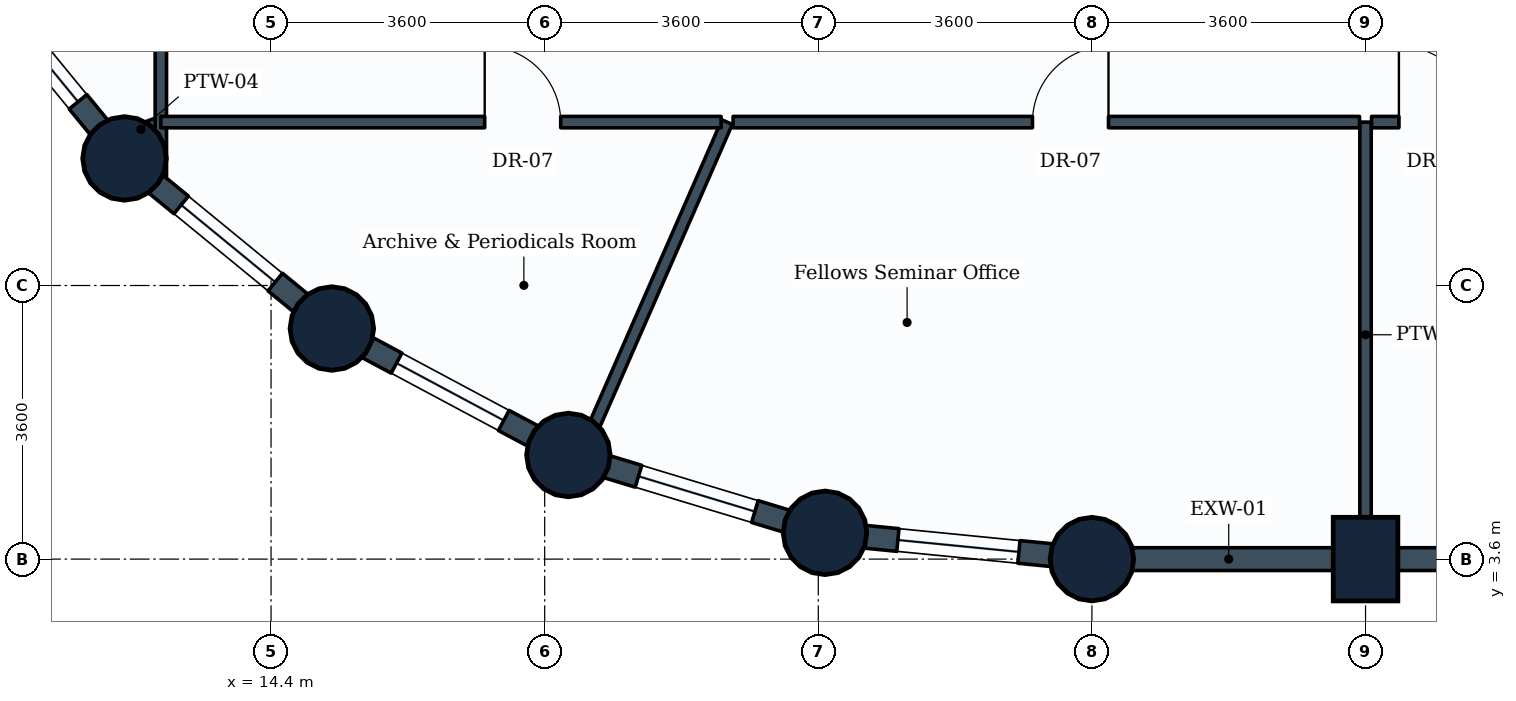
"""IFC4 building model, lengths in metres.
Left out: names, types, materials, properties, quantities, classifications, styles, units other than length and angle.
Written with IfcOpenShell. Run it as: python <this file> out.ifc"""

import sys

from ifc_helpers import new_model, si_unit, direction, frame, frame_2d, origin, origin_2d, place, context, subcontext, project, spatial, rectangle, circle, extrude, element, fill, save


model = new_model("IFC4")
c1 = context("Model", 3, precision=1e-05, world=origin(), true_north=direction((0.0, 1.0)))
c2 = subcontext(c1, "Body", "Model", "MODEL_VIEW")
j1 = project(units=[si_unit("LENGTHUNIT", "METRE"), si_unit("PLANEANGLEUNIT", "RADIAN")], contexts=[c1])
p1 = place(None, origin())
s1 = spatial("IfcSite", under=j1, at=p1, CompositionType="ELEMENT")
p2 = place(p1, origin())
s2 = spatial("IfcBuilding", under=s1, at=p2, CompositionType="ELEMENT")
p3 = place(p2, frame((0.0, 0.0, 91.8)))
s3 = spatial("IfcBuildingStorey", under=s2, at=p3, CompositionType="ELEMENT", Elevation=91.8)
for number, where, z_axis, x_axis in (
    (1, (12.472, 8.872, 0.0), (0.0, 0.0, 1.0), (1.0, 0.0, 0.0)),
    (2, (15.2, 6.634, 0.0), (0.0, 0.0, 1.0), (1.0, 0.0, 0.0)),
    (3, (18.312, 4.97, 0.0), (0.0, 0.0, 1.0), (1.0, 0.0, 0.0)),
    (4, (21.688, 3.946, 0.0), (0.0, 0.0, 1.0), (1.0, 0.0, 0.0)),
    (5, (25.2, 3.6, 0.0), (0.0, 0.0, 1.0), (1.0, 0.0, 0.0)),
):
    element("IfcColumn", number, at=place(p3, frame(where, z_axis=z_axis, x_axis=x_axis)), inside=s3, PredefinedType="COLUMN", context=c2, shape_type="SweptSolid", body=[
        extrude(circle(Radius=0.55, at=origin_2d()), origin(), (0.0, 0.0, 1.0), 3.9),
    ])
p4 = place(p3, frame((28.8, 3.6, 0.0), z_axis=(0.0, 0.0, 1.0), x_axis=(1.0, 0.0, 0.0)))
e6 = element("IfcColumn", 6, at=p4, inside=s3, PredefinedType="COLUMN", context=c2, shape_type="SweptSolid", body=[
    extrude(rectangle(XDim=0.85, YDim=1.1, at=origin_2d()), origin(), (0.0, 0.0, 1.0), 3.9),
])
p5 = place(p3, frame((28.8, 3.6, 0.0), z_axis=(0.0, 0.0, 1.0), x_axis=(-1.0, 0.0, 0.0)))
e7 = element("IfcWall", 7, at=p5, inside=s3, PredefinedType="STANDARD", context=c2, shape_type="SweptSolid", body=[
    extrude(rectangle(XDim=3.6, YDim=0.3, at=frame_2d((1.8, 0.0))), origin(), (0.0, 0.0, 1.0), 2.93),
])
p6 = place(p3, frame((32.4, 3.6, 0.0), z_axis=(0.0, 0.0, 1.0), x_axis=(-1.0, 0.0, 0.0)))
e8 = element("IfcWall", 8, at=p6, inside=s3, PredefinedType="STANDARD", context=c2, shape_type="SweptSolid", body=[
    extrude(rectangle(XDim=3.6, YDim=0.3, at=frame_2d((1.8, 0.0))), origin(), (0.0, 0.0, 1.0), 2.93),
])
p7 = place(p3, frame((12.472, 8.872, 0.0), z_axis=(0.0, 0.0, 1.0), x_axis=(-0.634258295121, 0.773121216285, 0.0)))
e9 = element("IfcWall", 9, at=p7, inside=s3, PredefinedType="STANDARD", context=c2, shape_type="SweptSolid", body=[
    extrude(rectangle(XDim=3.529, YDim=0.3, at=frame_2d((1.764, 0.0))), origin(), (0.0, 0.0, 1.0), 2.93),
])
p8 = place(p7, frame((0.964, 0.0, 0.85)))
e10 = element("IfcOpeningElement", 10, at=p8, cuts=e9, PredefinedType="OPENING", context=c2, shape_type="SweptSolid", body=[
    extrude(rectangle(XDim=1.6, YDim=1.35, at=frame_2d((0.8, 0.675))), frame((0.0, 0.16, 0.0), z_axis=(0.0, -1.0, 0.0), x_axis=(1.0, 0.0, 0.0)), (0.0, 0.0, 1.0), 0.32),
])
p9 = place(p3, frame((15.2, 6.634, 0.0), z_axis=(0.0, 0.0, 1.0), x_axis=(-0.773121216285, 0.634258295121, 0.0)))
e11 = element("IfcWall", 11, at=p9, inside=s3, PredefinedType="STANDARD", context=c2, shape_type="SweptSolid", body=[
    extrude(rectangle(XDim=3.529, YDim=0.3, at=frame_2d((1.764, 0.0))), origin(), (0.0, 0.0, 1.0), 2.93),
])
p10 = place(p9, frame((0.964, 0.0, 0.85)))
e12 = element("IfcOpeningElement", 12, at=p10, cuts=e11, PredefinedType="OPENING", context=c2, shape_type="SweptSolid", body=[
    extrude(rectangle(XDim=1.6, YDim=1.35, at=frame_2d((0.8, 0.675))), frame((0.0, 0.16, 0.0), z_axis=(0.0, -1.0, 0.0), x_axis=(1.0, 0.0, 0.0)), (0.0, 0.0, 1.0), 0.32),
])
p11 = place(p3, frame((18.312, 4.97, 0.0), z_axis=(0.0, 0.0, 1.0), x_axis=(-0.881846862014, 0.471535907389, 0.0)))
e13 = element("IfcWall", 13, at=p11, inside=s3, PredefinedType="STANDARD", context=c2, shape_type="SweptSolid", body=[
    extrude(rectangle(XDim=3.529, YDim=0.3, at=frame_2d((1.765, 0.0))), origin(), (0.0, 0.0, 1.0), 2.93),
])
p12 = place(p11, frame((0.964, 0.0, 0.85)))
e14 = element("IfcOpeningElement", 14, at=p12, cuts=e13, PredefinedType="OPENING", context=c2, shape_type="SweptSolid", body=[
    extrude(rectangle(XDim=1.6, YDim=1.35, at=frame_2d((0.8, 0.675))), frame((0.0, 0.16, 0.0), z_axis=(0.0, -1.0, 0.0), x_axis=(1.0, 0.0, 0.0)), (0.0, 0.0, 1.0), 0.32),
])
p13 = place(p3, frame((21.688, 3.946, 0.0), z_axis=(0.0, 0.0, 1.0), x_axis=(-0.956953367403, 0.290241714123, 0.0)))
e15 = element("IfcWall", 15, at=p13, inside=s3, PredefinedType="STANDARD", context=c2, shape_type="SweptSolid", body=[
    extrude(rectangle(XDim=3.528, YDim=0.3, at=frame_2d((1.764, 0.0))), origin(), (0.0, 0.0, 1.0), 2.93),
])
p14 = place(p13, frame((0.964, 0.0, 0.85)))
e16 = element("IfcOpeningElement", 16, at=p14, cuts=e15, PredefinedType="OPENING", context=c2, shape_type="SweptSolid", body=[
    extrude(rectangle(XDim=1.6, YDim=1.35, at=frame_2d((0.8, 0.675))), frame((0.0, 0.16, 0.0), z_axis=(0.0, -1.0, 0.0), x_axis=(1.0, 0.0, 0.0)), (0.0, 0.0, 1.0), 0.32),
])
p15 = place(p3, frame((25.2, 3.6, 0.0), z_axis=(0.0, 0.0, 1.0), x_axis=(-0.995183369056, 0.098030923459, 0.0)))
e17 = element("IfcWall", 17, at=p15, inside=s3, PredefinedType="STANDARD", context=c2, shape_type="SweptSolid", body=[
    extrude(rectangle(XDim=3.529, YDim=0.3, at=frame_2d((1.765, 0.0))), origin(), (0.0, 0.0, 1.0), 2.93),
])
p16 = place(p15, frame((0.965, 0.0, 0.85)))
e18 = element("IfcOpeningElement", 18, at=p16, cuts=e17, PredefinedType="OPENING", context=c2, shape_type="SweptSolid", body=[
    extrude(rectangle(XDim=1.6, YDim=1.35, at=frame_2d((0.8, 0.675))), frame((0.0, 0.16, 0.0), z_axis=(0.0, -1.0, 0.0), x_axis=(1.0, 0.0, 0.0)), (0.0, 0.0, 1.0), 0.32),
])
p17 = place(p3, frame((28.8, 9.35, 0.0), z_axis=(0.0, 0.0, 1.0), x_axis=(0.0, -1.0, 0.0)))
e19 = element("IfcWall", 19, at=p17, inside=s3, PredefinedType="PARTITIONING", context=c2, shape_type="SweptSolid", body=[
    extrude(rectangle(XDim=5.596, YDim=0.15, at=frame_2d((2.798, 0.0))), origin(), (0.0, 0.0, 1.0), 3.635),
])
p18 = place(p3, frame((12.95, 9.35, 0.0), z_axis=(0.0, 0.0, 1.0), x_axis=(-0.939538101119, -0.342444384601, 0.0)))
e20 = element("IfcWall", 20, at=p18, inside=s3, PredefinedType="PARTITIONING", context=c2, shape_type="SweptSolid", body=[
    extrude(rectangle(XDim=0.559, YDim=0.15, at=frame_2d((0.279, 0.0))), origin(), (0.0, 0.0, 1.0), 2.93),
])
p19 = place(p3, frame((20.4, 9.35, 0.0), z_axis=(0.0, 0.0, 1.0), x_axis=(-0.400957621756, -0.916096602742, 0.0)))
e21 = element("IfcWall", 21, at=p19, inside=s3, PredefinedType="PARTITIONING", context=c2, shape_type="SweptSolid", body=[
    extrude(rectangle(XDim=4.706, YDim=0.15, at=frame_2d((2.353, 0.0))), origin(), (0.0, 0.0, 1.0), 2.93),
])
p20 = place(p3, frame((12.95, 8.634, 0.0), z_axis=(0.0, 0.0, 1.0), x_axis=(0.0, 1.0, 0.0)))
e22 = element("IfcWall", 22, at=p20, inside=s3, PredefinedType="PARTITIONING", context=c2, shape_type="SweptSolid", body=[
    extrude(rectangle(XDim=8.087, YDim=0.15, at=frame_2d((4.043, 0.0))), origin(), (0.0, 0.0, 1.0), 2.93),
])
p21 = place(p20, frame((4.977, 0.0, 0.0)))
e23 = element("IfcOpeningElement", 23, at=p21, cuts=e22, PredefinedType="OPENING", context=c2, shape_type="SweptSolid", body=[
    extrude(rectangle(XDim=1.0, YDim=2.1, at=frame_2d((0.5, 1.05))), frame((0.0, 0.085, 0.0), z_axis=(0.0, -1.0, 0.0), x_axis=(1.0, 0.0, 0.0)), (0.0, 0.0, 1.0), 0.17),
])
p22 = place(p3, frame((12.95, 9.35, 0.0), z_axis=(0.0, 0.0, 1.0), x_axis=(1.0, 0.0, 0.0)))
e24 = element("IfcWall", 24, at=p22, inside=s3, PredefinedType="PARTITIONING", context=c2, shape_type="SweptSolid", body=[
    extrude(rectangle(XDim=7.371, YDim=0.15, at=frame_2d((3.686, 0.0))), origin(), (0.0, 0.0, 1.0), 3.19),
])
p23 = place(p22, frame((4.261, 0.0, 0.0)))
e25 = element("IfcOpeningElement", 25, at=p23, cuts=e24, PredefinedType="OPENING", context=c2, shape_type="SweptSolid", body=[
    extrude(rectangle(XDim=1.0, YDim=2.1, at=frame_2d((0.5, 1.05))), frame((0.0, 0.085, 0.0), z_axis=(0.0, -1.0, 0.0), x_axis=(1.0, 0.0, 0.0)), (0.0, 0.0, 1.0), 0.17),
])
p24 = place(p3, frame((20.479, 9.35, 0.0), z_axis=(0.0, 0.0, 1.0), x_axis=(1.0, 0.0, 0.0)))
e26 = element("IfcWall", 26, at=p24, inside=s3, PredefinedType="PARTITIONING", context=c2, shape_type="SweptSolid", body=[
    extrude(rectangle(XDim=8.242, YDim=0.15, at=frame_2d((4.121, 0.0))), origin(), (0.0, 0.0, 1.0), 3.18),
])
p25 = place(p24, frame((3.939, 0.0, 0.0)))
e27 = element("IfcOpeningElement", 27, at=p25, cuts=e26, PredefinedType="OPENING", context=c2, shape_type="SweptSolid", body=[
    extrude(rectangle(XDim=1.0, YDim=2.1, at=frame_2d((0.5, 1.05))), frame((0.0, 0.085, 0.0), z_axis=(0.0, -1.0, 0.0), x_axis=(1.0, 0.0, 0.0)), (0.0, 0.0, 1.0), 0.17),
])
p26 = place(p3, frame((28.879, 9.35, 0.0), z_axis=(0.0, 0.0, 1.0), x_axis=(1.0, 0.0, 0.0)))
e28 = element("IfcWall", 28, at=p26, inside=s3, PredefinedType="PARTITIONING", context=c2, shape_type="SweptSolid", body=[
    extrude(rectangle(XDim=5.521, YDim=0.15, at=frame_2d((2.76, 0.0))), origin(), (0.0, 0.0, 1.0), 3.635),
])
p27 = place(p26, frame((0.36, 0.0, 0.0)))
e29 = element("IfcOpeningElement", 29, at=p27, cuts=e28, PredefinedType="OPENING", context=c2, shape_type="SweptSolid", body=[
    extrude(rectangle(XDim=1.0, YDim=2.1, at=frame_2d((0.5, 1.05))), frame((0.0, 0.085, 0.0), z_axis=(0.0, -1.0, 0.0), x_axis=(1.0, 0.0, 0.0)), (0.0, 0.0, 1.0), 0.17),
])
p28 = place(p8, origin())
e30 = element("IfcWindow", 30, at=p28, inside=s3, PartitioningType="SINGLE_PANEL", PredefinedType="WINDOW", context=c2, shape_type="SweptSolid", body=[
    extrude(rectangle(XDim=1.6, YDim=1.35, at=frame_2d((0.8, 0.675))), frame((0.0, 0.03, 0.0), z_axis=(0.0, -1.0, 0.0), x_axis=(1.0, 0.0, 0.0)), (0.0, 0.0, 1.0), 0.06),
])
fill(e10, e30)
p29 = place(p10, origin())
e31 = element("IfcWindow", 31, at=p29, inside=s3, PartitioningType="SINGLE_PANEL", PredefinedType="WINDOW", context=c2, shape_type="SweptSolid", body=[
    extrude(rectangle(XDim=1.6, YDim=1.35, at=frame_2d((0.8, 0.675))), frame((0.0, 0.03, 0.0), z_axis=(0.0, -1.0, 0.0), x_axis=(1.0, 0.0, 0.0)), (0.0, 0.0, 1.0), 0.06),
])
fill(e12, e31)
p30 = place(p12, origin())
e32 = element("IfcWindow", 32, at=p30, inside=s3, PartitioningType="SINGLE_PANEL", PredefinedType="WINDOW", context=c2, shape_type="SweptSolid", body=[
    extrude(rectangle(XDim=1.6, YDim=1.35, at=frame_2d((0.8, 0.675))), frame((0.0, 0.03, 0.0), z_axis=(0.0, -1.0, 0.0), x_axis=(1.0, 0.0, 0.0)), (0.0, 0.0, 1.0), 0.06),
])
fill(e14, e32)
p31 = place(p14, origin())
e33 = element("IfcWindow", 33, at=p31, inside=s3, PartitioningType="SINGLE_PANEL", PredefinedType="WINDOW", context=c2, shape_type="SweptSolid", body=[
    extrude(rectangle(XDim=1.6, YDim=1.35, at=frame_2d((0.8, 0.675))), frame((0.0, 0.03, 0.0), z_axis=(0.0, -1.0, 0.0), x_axis=(1.0, 0.0, 0.0)), (0.0, 0.0, 1.0), 0.06),
])
fill(e16, e33)
p32 = place(p16, origin())
e34 = element("IfcWindow", 34, at=p32, inside=s3, PartitioningType="SINGLE_PANEL", PredefinedType="WINDOW", context=c2, shape_type="SweptSolid", body=[
    extrude(rectangle(XDim=1.6, YDim=1.35, at=frame_2d((0.8, 0.675))), frame((0.0, 0.03, 0.0), z_axis=(0.0, -1.0, 0.0), x_axis=(1.0, 0.0, 0.0)), (0.0, 0.0, 1.0), 0.06),
])
fill(e18, e34)
p33 = place(p23, origin())
e35 = element("IfcDoor", 35, at=p33, inside=s3, OperationType="SINGLE_SWING_LEFT", PredefinedType="DOOR", context=c2, shape_type="SweptSolid", body=[
    extrude(rectangle(XDim=1.0, YDim=2.1, at=frame_2d((0.5, 1.05))), frame((0.0, 0.025, 0.0), z_axis=(0.0, -1.0, 0.0), x_axis=(1.0, 0.0, 0.0)), (0.0, 0.0, 1.0), 0.05),
])
fill(e25, e35)
p34 = place(p25, origin())
e36 = element("IfcDoor", 36, at=p34, inside=s3, OperationType="SINGLE_SWING_RIGHT", PredefinedType="DOOR", context=c2, shape_type="SweptSolid", body=[
    extrude(rectangle(XDim=1.0, YDim=2.1, at=frame_2d((0.5, 1.05))), frame((0.0, 0.025, 0.0), z_axis=(0.0, -1.0, 0.0), x_axis=(1.0, 0.0, 0.0)), (0.0, 0.0, 1.0), 0.05),
])
fill(e27, e36)
p35 = place(p27, origin())
e37 = element("IfcDoor", 37, at=p35, inside=s3, OperationType="SINGLE_SWING_LEFT", PredefinedType="DOOR", context=c2, shape_type="SweptSolid", body=[
    extrude(rectangle(XDim=1.0, YDim=2.1, at=frame_2d((0.5, 1.05))), frame((0.0, 0.025, 0.0), z_axis=(0.0, -1.0, 0.0), x_axis=(1.0, 0.0, 0.0)), (0.0, 0.0, 1.0), 0.05),
])
fill(e29, e37)
save(model, sys.argv[1])
